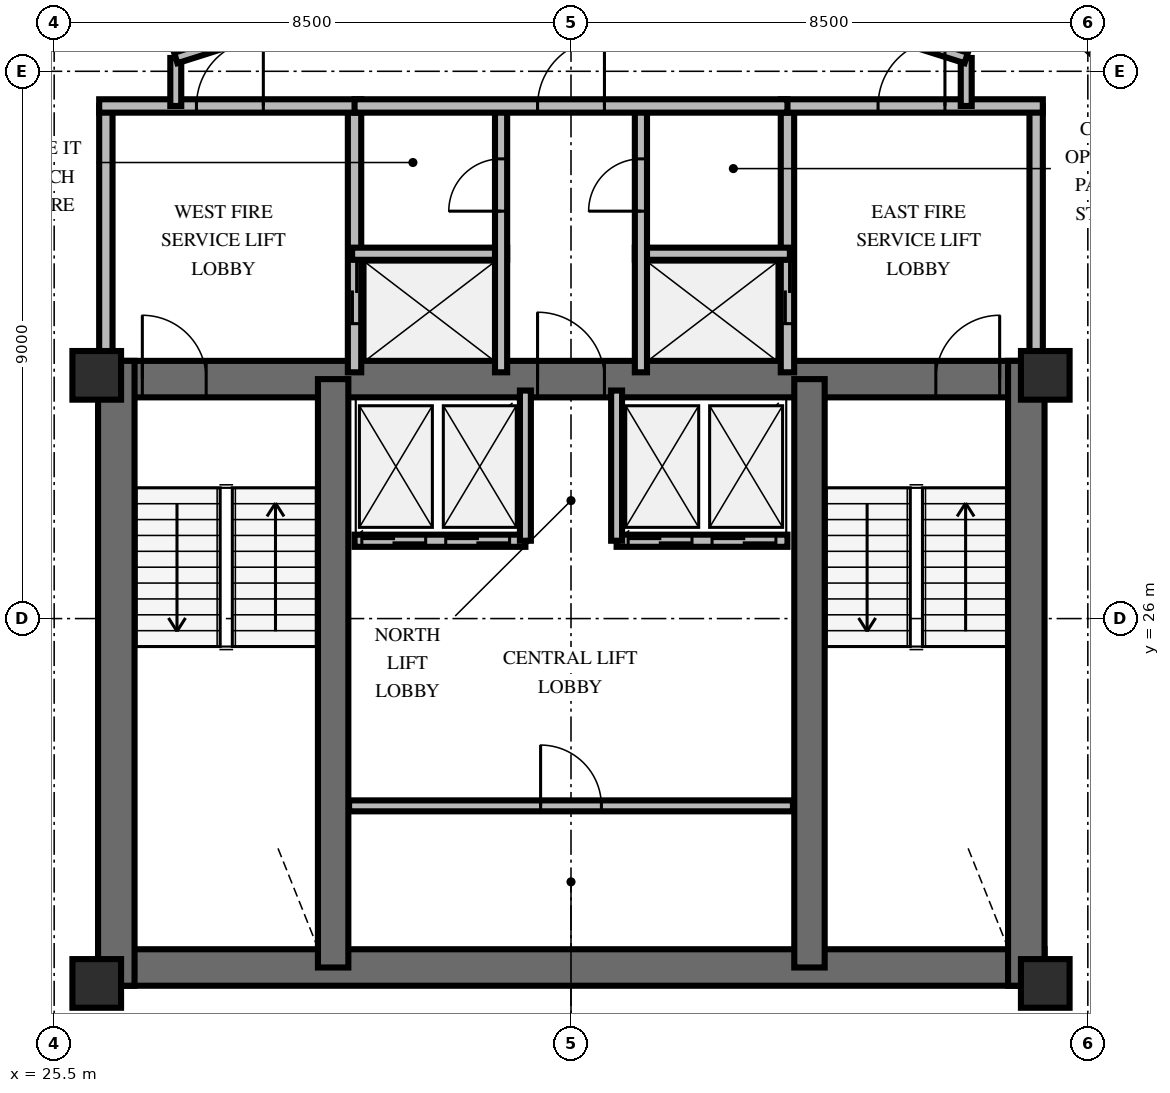
"""IFC4 building model, lengths in metres.
Left out: names, types, materials, properties, quantities, classifications, styles, units other than length and angle.
Written with IfcOpenShell. Run it as: python <this file> out.ifc"""

import sys

from ifc_helpers import new_model, si_unit, direction, frame, frame_2d, origin, origin_2d, place, context, subcontext, project, spatial, rectangle, extrude, element, fill, save


model = new_model("IFC4")
c1 = context("Model", 3, precision=1e-05, world=origin(), true_north=direction((0.0, 1.0)))
c2 = subcontext(c1, "Body", "Model", "MODEL_VIEW")
j1 = project(units=[si_unit("LENGTHUNIT", "METRE"), si_unit("PLANEANGLEUNIT", "RADIAN")], contexts=[c1])
p1 = place(None, origin())
s1 = spatial("IfcSite", under=j1, at=p1, CompositionType="ELEMENT")
p2 = place(p1, origin())
s2 = spatial("IfcBuilding", under=s1, at=p2, CompositionType="ELEMENT")
p3 = place(p2, frame((0.0, 0.0, 255.6)))
s3 = spatial("IfcBuildingStorey", under=s2, at=p3, CompositionType="ELEMENT", Elevation=255.6)
p4 = place(p3, frame((26.222, 20.262, 0.0), z_axis=(0.0, 0.0, 1.0), x_axis=(1.0, 0.0, 0.0)))
e1 = element("IfcWall", 1, at=p4, inside=s3, PredefinedType="SHEAR", context=c2, shape_type="SweptSolid", body=[
    extrude(rectangle(XDim=15.566, YDim=0.6, at=frame_2d((7.783, 0.0))), origin(), (0.0, 0.0, 1.0), 3.6),
])
p5 = place(p3, frame((26.222, 29.938, 0.0), z_axis=(0.0, 0.0, 1.0), x_axis=(1.0, 0.0, 0.0)))
e2 = element("IfcWall", 2, at=p5, inside=s3, PredefinedType="SHEAR", context=c2, shape_type="SweptSolid", body=[
    extrude(rectangle(XDim=15.566, YDim=0.6, at=frame_2d((7.783, 0.0))), origin(), (0.0, 0.0, 1.0), 3.6),
])
p6 = place(p5, frame((0.728, 0.0, 0.0)))
e3 = element("IfcOpeningElement", 3, at=p6, cuts=e2, PredefinedType="OPENING", context=c2, shape_type="SweptSolid", body=[
    extrude(rectangle(XDim=1.05, YDim=2.15, at=frame_2d((0.525, 1.075))), frame((0.0, 0.31, 0.0), z_axis=(0.0, -1.0, 0.0), x_axis=(1.0, 0.0, 0.0)), (0.0, 0.0, 1.0), 0.62),
])
p7 = place(p5, frame((13.778, 0.0, 0.0)))
e4 = element("IfcOpeningElement", 4, at=p7, cuts=e2, PredefinedType="OPENING", context=c2, shape_type="SweptSolid", body=[
    extrude(rectangle(XDim=1.05, YDim=2.15, at=frame_2d((0.525, 1.075))), frame((0.0, 0.31, 0.0), z_axis=(0.0, -1.0, 0.0), x_axis=(1.0, 0.0, 0.0)), (0.0, 0.0, 1.0), 0.62),
])
p8 = place(p5, frame((7.228, 0.0, 0.0)))
e5 = element("IfcOpeningElement", 5, at=p8, cuts=e2, PredefinedType="OPENING", context=c2, shape_type="SweptSolid", body=[
    extrude(rectangle(XDim=1.1, YDim=2.15, at=frame_2d((0.55, 1.075))), frame((0.0, 0.31, 0.0), z_axis=(0.0, -1.0, 0.0), x_axis=(1.0, 0.0, 0.0)), (0.0, 0.0, 1.0), 0.62),
])
for number, where, z_axis, x_axis in (
    (6, (26.522, 19.962, 0.0), (0.0, 0.0, 1.0), (0.0, 1.0, 0.0)),
    (7, (41.488, 19.962, 0.0), (0.0, 0.0, 1.0), (0.0, 1.0, 0.0)),
):
    element("IfcWall", number, at=place(p3, frame(where, z_axis=z_axis, x_axis=x_axis)), inside=s3, PredefinedType="SHEAR", context=c2, shape_type="SweptSolid", body=[
        extrude(rectangle(XDim=10.276, YDim=0.6, at=frame_2d((5.138, 0.0))), origin(), (0.0, 0.0, 1.0), 3.6),
    ])
for number, where, z_axis, x_axis in (
    (8, (30.088, 20.262, 0.0), (0.0, 0.0, 1.0), (0.0, 1.0, 0.0)),
    (9, (37.922, 20.262, 0.0), (0.0, 0.0, 1.0), (0.0, 1.0, 0.0)),
):
    element("IfcWall", number, at=place(p3, frame(where, z_axis=z_axis, x_axis=x_axis)), inside=s3, PredefinedType="SHEAR", context=c2, shape_type="SweptSolid", body=[
        extrude(rectangle(XDim=9.676, YDim=0.5, at=frame_2d((4.838, 0.0))), origin(), (0.0, 0.0, 1.0), 3.6),
    ])
for number, where, z_axis, x_axis in (
    (10, (26.2, 20.0, 0.0), (0.0, 0.0, 1.0), (1.0, 0.0, 0.0)),
    (11, (41.8, 20.0, 0.0), (0.0, 0.0, 1.0), (1.0, 0.0, 0.0)),
    (12, (26.2, 30.0, 0.0), (0.0, 0.0, 1.0), (1.0, 0.0, 0.0)),
    (13, (41.8, 30.0, 0.0), (0.0, 0.0, 1.0), (1.0, 0.0, 0.0)),
):
    element("IfcColumn", number, at=place(p3, frame(where, z_axis=z_axis, x_axis=x_axis)), inside=s3, PredefinedType="PILASTER", context=c2, shape_type="SweptSolid", body=[
        extrude(rectangle(XDim=0.8, YDim=0.8, at=origin_2d()), origin(), (0.0, 0.0, 1.0), 3.6),
    ])
p9 = place(p3, frame((26.35, 30.05, 0.0), z_axis=(0.0, 0.0, 1.0), x_axis=(0.0, 1.0, 0.0)))
e14 = element("IfcWall", 14, at=p9, inside=s3, PredefinedType="SOLIDWALL", context=c2, shape_type="SweptSolid", body=[
    extrude(rectangle(XDim=4.38, YDim=0.22, at=frame_2d((2.19, 0.0))), origin(), (0.0, 0.0, 1.0), 2.46),
])
p10 = place(p3, frame((30.44, 30.05, 0.0), z_axis=(0.0, 0.0, 1.0), x_axis=(0.0, 1.0, 0.0)))
e15 = element("IfcWall", 15, at=p10, inside=s3, PredefinedType="SOLIDWALL", context=c2, shape_type="SweptSolid", body=[
    extrude(rectangle(XDim=4.38, YDim=0.22, at=frame_2d((2.19, 0.0))), origin(), (0.0, 0.0, 1.0), 2.46),
])
p11 = place(p10, frame((0.8, 0.0, 0.0)))
e16 = element("IfcOpeningElement", 16, at=p11, cuts=e15, PredefinedType="OPENING", context=c2, shape_type="SweptSolid", body=[
    extrude(rectangle(XDim=1.05, YDim=2.1, at=frame_2d((0.525, 1.05))), frame((0.0, 0.12, 0.0), z_axis=(0.0, -1.0, 0.0), x_axis=(1.0, 0.0, 0.0)), (0.0, 0.0, 1.0), 0.24),
])
p12 = place(p3, frame((26.24, 34.43, 0.0), z_axis=(0.0, 0.0, 1.0), x_axis=(1.0, 0.0, 0.0)))
e17 = element("IfcWall", 17, at=p12, inside=s3, PredefinedType="SOLIDWALL", context=c2, shape_type="SweptSolid", body=[
    extrude(rectangle(XDim=4.31, YDim=0.22, at=frame_2d((2.155, 0.0))), origin(), (0.0, 0.0, 1.0), 2.46),
])
p13 = place(p12, frame((1.6, 0.0, 0.0)))
e18 = element("IfcOpeningElement", 18, at=p13, cuts=e17, PredefinedType="OPENING", context=c2, shape_type="SweptSolid", body=[
    extrude(rectangle(XDim=1.1, YDim=2.15, at=frame_2d((0.55, 1.075))), frame((0.0, 0.12, 0.0), z_axis=(0.0, -1.0, 0.0), x_axis=(1.0, 0.0, 0.0)), (0.0, 0.0, 1.0), 0.24),
])
p14 = place(p3, frame((30.4, 32.0, 0.0), z_axis=(0.0, 0.0, 1.0), x_axis=(1.0, 0.0, 0.0)))
e19 = element("IfcWall", 19, at=p14, inside=s3, PredefinedType="SOLIDWALL", context=c2, shape_type="SweptSolid", body=[
    extrude(rectangle(XDim=2.55, YDim=0.2, at=frame_2d((1.275, 0.0))), origin(), (0.0, 0.0, 1.0), 2.46),
])
p15 = place(p3, frame((32.85, 30.05, 0.0), z_axis=(0.0, 0.0, 1.0), x_axis=(0.0, 1.0, 0.0)))
e20 = element("IfcWall", 20, at=p15, inside=s3, PredefinedType="SOLIDWALL", context=c2, shape_type="SweptSolid", body=[
    extrude(rectangle(XDim=4.38, YDim=0.2, at=frame_2d((2.19, 0.0))), origin(), (0.0, 0.0, 1.0), 2.46),
])
p16 = place(p15, frame((2.65, 0.0, 0.0)))
e21 = element("IfcOpeningElement", 21, at=p16, cuts=e20, PredefinedType="OPENING", context=c2, shape_type="SweptSolid", body=[
    extrude(rectangle(XDim=0.86, YDim=2.05, at=frame_2d((0.43, 1.025))), frame((0.0, 0.11, 0.0), z_axis=(0.0, -1.0, 0.0), x_axis=(1.0, 0.0, 0.0)), (0.0, 0.0, 1.0), 0.22),
])
p17 = place(p3, frame((37.56, 30.05, 0.0), z_axis=(0.0, 0.0, 1.0), x_axis=(0.0, 1.0, 0.0)))
e22 = element("IfcWall", 22, at=p17, inside=s3, PredefinedType="SOLIDWALL", context=c2, shape_type="SweptSolid", body=[
    extrude(rectangle(XDim=4.38, YDim=0.22, at=frame_2d((2.19, 0.0))), origin(), (0.0, 0.0, 1.0), 2.46),
])
p18 = place(p17, frame((0.8, 0.0, 0.0)))
e23 = element("IfcOpeningElement", 23, at=p18, cuts=e22, PredefinedType="OPENING", context=c2, shape_type="SweptSolid", body=[
    extrude(rectangle(XDim=1.05, YDim=2.1, at=frame_2d((0.525, 1.05))), frame((0.0, 0.12, 0.0), z_axis=(0.0, -1.0, 0.0), x_axis=(1.0, 0.0, 0.0)), (0.0, 0.0, 1.0), 0.24),
])
p19 = place(p3, frame((41.65, 30.05, 0.0), z_axis=(0.0, 0.0, 1.0), x_axis=(0.0, 1.0, 0.0)))
e24 = element("IfcWall", 24, at=p19, inside=s3, PredefinedType="SOLIDWALL", context=c2, shape_type="SweptSolid", body=[
    extrude(rectangle(XDim=4.38, YDim=0.22, at=frame_2d((2.19, 0.0))), origin(), (0.0, 0.0, 1.0), 2.46),
])
p20 = place(p3, frame((37.45, 34.43, 0.0), z_axis=(0.0, 0.0, 1.0), x_axis=(1.0, 0.0, 0.0)))
e25 = element("IfcWall", 25, at=p20, inside=s3, PredefinedType="SOLIDWALL", context=c2, shape_type="SweptSolid", body=[
    extrude(rectangle(XDim=4.31, YDim=0.22, at=frame_2d((2.155, 0.0))), origin(), (0.0, 0.0, 1.0), 2.46),
])
p21 = place(p20, frame((1.6, 0.0, 0.0)))
e26 = element("IfcOpeningElement", 26, at=p21, cuts=e25, PredefinedType="OPENING", context=c2, shape_type="SweptSolid", body=[
    extrude(rectangle(XDim=1.1, YDim=2.15, at=frame_2d((0.55, 1.075))), frame((0.0, 0.12, 0.0), z_axis=(0.0, -1.0, 0.0), x_axis=(1.0, 0.0, 0.0)), (0.0, 0.0, 1.0), 0.24),
])
p22 = place(p3, frame((35.05, 32.0, 0.0), z_axis=(0.0, 0.0, 1.0), x_axis=(1.0, 0.0, 0.0)))
e27 = element("IfcWall", 27, at=p22, inside=s3, PredefinedType="SOLIDWALL", context=c2, shape_type="SweptSolid", body=[
    extrude(rectangle(XDim=2.55, YDim=0.2, at=frame_2d((1.275, 0.0))), origin(), (0.0, 0.0, 1.0), 2.46),
])
p23 = place(p3, frame((35.15, 30.05, 0.0), z_axis=(0.0, 0.0, 1.0), x_axis=(0.0, 1.0, 0.0)))
e28 = element("IfcWall", 28, at=p23, inside=s3, PredefinedType="SOLIDWALL", context=c2, shape_type="SweptSolid", body=[
    extrude(rectangle(XDim=4.38, YDim=0.2, at=frame_2d((2.19, 0.0))), origin(), (0.0, 0.0, 1.0), 2.46),
])
p24 = place(p23, frame((2.65, 0.0, 0.0)))
e29 = element("IfcOpeningElement", 29, at=p24, cuts=e28, PredefinedType="OPENING", context=c2, shape_type="SweptSolid", body=[
    extrude(rectangle(XDim=0.86, YDim=2.05, at=frame_2d((0.43, 1.025))), frame((0.0, 0.11, 0.0), z_axis=(0.0, -1.0, 0.0), x_axis=(1.0, 0.0, 0.0)), (0.0, 0.0, 1.0), 0.22),
])
p25 = place(p3, frame((30.44, 34.43, 0.0), z_axis=(0.0, 0.0, 1.0), x_axis=(1.0, 0.0, 0.0)))
e30 = element("IfcWall", 30, at=p25, inside=s3, PredefinedType="SOLIDWALL", context=c2, shape_type="SweptSolid", body=[
    extrude(rectangle(XDim=7.12, YDim=0.22, at=frame_2d((3.56, 0.0))), origin(), (0.0, 0.0, 1.0), 2.46),
])
p26 = place(p25, frame((3.01, 0.0, 0.0)))
e31 = element("IfcOpeningElement", 31, at=p26, cuts=e30, PredefinedType="OPENING", context=c2, shape_type="SweptSolid", body=[
    extrude(rectangle(XDim=1.1, YDim=2.15, at=frame_2d((0.55, 1.075))), frame((0.0, 0.12, 0.0), z_axis=(0.0, -1.0, 0.0), x_axis=(1.0, 0.0, 0.0)), (0.0, 0.0, 1.0), 0.24),
])
p27 = place(p3, frame((30.35, 22.92, 0.0), z_axis=(0.0, 0.0, 1.0), x_axis=(1.0, 0.0, 0.0)))
e32 = element("IfcWall", 32, at=p27, inside=s3, PredefinedType="PARTITIONING", context=c2, shape_type="SweptSolid", body=[
    extrude(rectangle(XDim=7.3, YDim=0.18, at=frame_2d((3.65, 0.0))), origin(), (0.0, 0.0, 1.0), 2.46),
])
p28 = place(p27, frame((3.15, 0.0, 0.0)))
e33 = element("IfcOpeningElement", 33, at=p28, cuts=e32, PredefinedType="OPENING", context=c2, shape_type="SweptSolid", body=[
    extrude(rectangle(XDim=1.0, YDim=2.15, at=frame_2d((0.5, 1.075))), frame((0.0, 0.1, 0.0), z_axis=(0.0, -1.0, 0.0), x_axis=(1.0, 0.0, 0.0)), (0.0, 0.0, 1.0), 0.2),
])
p29 = place(p3, frame((30.44, 27.28, 0.0), z_axis=(0.0, 0.0, 1.0), x_axis=(1.0, 0.0, 0.0)))
e34 = element("IfcWall", 34, at=p29, inside=s3, PredefinedType="SOLIDWALL", context=c2, shape_type="SweptSolid", body=[
    extrude(rectangle(XDim=2.81, YDim=0.2, at=frame_2d((1.405, 0.0))), origin(), (0.0, 0.0, 1.0), 2.46),
])
p30 = place(p29, frame((0.12, 0.0, 0.0)))
e35 = element("IfcOpeningElement", 35, at=p30, cuts=e34, PredefinedType="OPENING", context=c2, shape_type="SweptSolid", body=[
    extrude(rectangle(XDim=1.05, YDim=2.1, at=frame_2d((0.525, 1.05))), frame((0.0, 0.11, 0.0), z_axis=(0.0, -1.0, 0.0), x_axis=(1.0, 0.0, 0.0)), (0.0, 0.0, 1.0), 0.22),
])
p31 = place(p29, frame((1.5, 0.0, 0.0)))
e36 = element("IfcOpeningElement", 36, at=p31, cuts=e34, PredefinedType="OPENING", context=c2, shape_type="SweptSolid", body=[
    extrude(rectangle(XDim=1.05, YDim=2.1, at=frame_2d((0.525, 1.05))), frame((0.0, 0.11, 0.0), z_axis=(0.0, -1.0, 0.0), x_axis=(1.0, 0.0, 0.0)), (0.0, 0.0, 1.0), 0.22),
])
p32 = place(p3, frame((33.25, 27.28, 0.0), z_axis=(0.0, 0.0, 1.0), x_axis=(0.0, 1.0, 0.0)))
e37 = element("IfcWall", 37, at=p32, inside=s3, PredefinedType="SOLIDWALL", context=c2, shape_type="SweptSolid", body=[
    extrude(rectangle(XDim=2.47, YDim=0.18, at=frame_2d((1.235, 0.0))), origin(), (0.0, 0.0, 1.0), 2.46),
])
p33 = place(p3, frame((34.75, 27.28, 0.0), z_axis=(0.0, 0.0, 1.0), x_axis=(1.0, 0.0, 0.0)))
e38 = element("IfcWall", 38, at=p33, inside=s3, PredefinedType="SOLIDWALL", context=c2, shape_type="SweptSolid", body=[
    extrude(rectangle(XDim=2.81, YDim=0.2, at=frame_2d((1.405, 0.0))), origin(), (0.0, 0.0, 1.0), 2.46),
])
p34 = place(p33, frame((0.19, 0.0, 0.0)))
e39 = element("IfcOpeningElement", 39, at=p34, cuts=e38, PredefinedType="OPENING", context=c2, shape_type="SweptSolid", body=[
    extrude(rectangle(XDim=1.05, YDim=2.1, at=frame_2d((0.525, 1.05))), frame((0.0, 0.11, 0.0), z_axis=(0.0, -1.0, 0.0), x_axis=(1.0, 0.0, 0.0)), (0.0, 0.0, 1.0), 0.22),
])
p35 = place(p33, frame((1.57, 0.0, 0.0)))
e40 = element("IfcOpeningElement", 40, at=p35, cuts=e38, PredefinedType="OPENING", context=c2, shape_type="SweptSolid", body=[
    extrude(rectangle(XDim=1.05, YDim=2.1, at=frame_2d((0.525, 1.05))), frame((0.0, 0.11, 0.0), z_axis=(0.0, -1.0, 0.0), x_axis=(1.0, 0.0, 0.0)), (0.0, 0.0, 1.0), 0.22),
])
p36 = place(p3, frame((34.75, 27.28, 0.0), z_axis=(0.0, 0.0, 1.0), x_axis=(0.0, 1.0, 0.0)))
e41 = element("IfcWall", 41, at=p36, inside=s3, PredefinedType="SOLIDWALL", context=c2, shape_type="SweptSolid", body=[
    extrude(rectangle(XDim=2.47, YDim=0.18, at=frame_2d((1.235, 0.0))), origin(), (0.0, 0.0, 1.0), 2.46),
])
for number, where, z_axis, x_axis in (
    (42, (27.5, 34.43, 0.0), (0.0, 0.0, 1.0), (0.0, 1.0, 0.0)),
    (43, (40.5, 35.219, 0.0), (0.0, 0.0, 1.0), (0.0, -1.0, 0.0)),
):
    element("IfcWall", number, at=place(p3, frame(where, z_axis=z_axis, x_axis=x_axis)), inside=s3, PredefinedType="PARTITIONING", context=c2, shape_type="SweptSolid", body=[
        extrude(rectangle(XDim=0.789, YDim=0.18, at=frame_2d((0.395, 0.0))), origin(), (0.0, 0.0, 1.0), 2.46),
    ])
p37 = place(p3, frame((27.5, 35.219, 0.0), z_axis=(0.0, 0.0, 1.0), x_axis=(0.953228121756, 0.302251795518, 0.0)))
e44 = element("IfcWall", 44, at=p37, inside=s3, PredefinedType="PARTITIONING", context=c2, shape_type="SweptSolid", body=[
    extrude(rectangle(XDim=6.819, YDim=0.18, at=frame_2d((3.409, 0.0))), origin(), (0.0, 0.0, 1.0), 2.46),
])
p38 = place(p37, frame((2.86, 0.0, 0.0)))
e45 = element("IfcOpeningElement", 45, at=p38, cuts=e44, PredefinedType="OPENING", context=c2, shape_type="SweptSolid", body=[
    extrude(rectangle(XDim=1.1, YDim=2.15, at=frame_2d((0.55, 1.075))), frame((0.0, 0.1, 0.0), z_axis=(0.0, -1.0, 0.0), x_axis=(1.0, 0.0, 0.0)), (0.0, 0.0, 1.0), 0.2),
])
p39 = place(p3, frame((34.0, 37.28, 0.0), z_axis=(0.0, 0.0, 1.0), x_axis=(0.953228121756, -0.302251795518, 0.0)))
e46 = element("IfcWall", 46, at=p39, inside=s3, PredefinedType="PARTITIONING", context=c2, shape_type="SweptSolid", body=[
    extrude(rectangle(XDim=6.819, YDim=0.18, at=frame_2d((3.409, 0.0))), origin(), (0.0, 0.0, 1.0), 2.46),
])
p40 = place(p39, frame((2.86, 0.0, 0.0)))
e47 = element("IfcOpeningElement", 47, at=p40, cuts=e46, PredefinedType="OPENING", context=c2, shape_type="SweptSolid", body=[
    extrude(rectangle(XDim=1.1, YDim=2.15, at=frame_2d((0.55, 1.075))), frame((0.0, 0.1, 0.0), z_axis=(0.0, -1.0, 0.0), x_axis=(1.0, 0.0, 0.0)), (0.0, 0.0, 1.0), 0.2),
])
p41 = place(p3, frame((44.121, 33.95, 0.0), z_axis=(0.0, 0.0, 1.0), x_axis=(-0.733136774685, 0.680081222799, 0.0)))
e48 = element("IfcWall", 48, at=p41, inside=s3, PredefinedType="PARTITIONING", context=c2, shape_type="SweptSolid", body=[
    extrude(rectangle(XDim=4.026, YDim=0.18, at=frame_2d((2.013, 0.0))), origin(), (0.0, 0.0, 1.0), 2.46),
])
p42 = place(p3, frame((28.735, 37.744, 0.0), z_axis=(0.0, 0.0, 1.0), x_axis=(-0.827595393885, -0.561325096552, 0.0)))
e49 = element("IfcWall", 49, at=p42, inside=s3, PredefinedType="PARTITIONING", context=c2, shape_type="SweptSolid", body=[
    extrude(rectangle(XDim=4.47, YDim=0.18, at=frame_2d((2.235, 0.0))), origin(), (0.0, 0.0, 1.0), 2.46),
])
p43 = place(p6, origin())
e50 = element("IfcDoor", 50, at=p43, inside=s3, OperationType="SINGLE_SWING_LEFT", PredefinedType="DOOR", context=c2, shape_type="SweptSolid", body=[
    extrude(rectangle(XDim=1.05, YDim=2.15, at=frame_2d((0.525, 1.075))), frame((0.0, 0.025, 0.0), z_axis=(0.0, -1.0, 0.0), x_axis=(1.0, 0.0, 0.0)), (0.0, 0.0, 1.0), 0.05),
])
fill(e3, e50)
p44 = place(p7, origin())
e51 = element("IfcDoor", 51, at=p44, inside=s3, OperationType="SINGLE_SWING_RIGHT", PredefinedType="DOOR", context=c2, shape_type="SweptSolid", body=[
    extrude(rectangle(XDim=1.05, YDim=2.15, at=frame_2d((0.525, 1.075))), frame((0.0, 0.025, 0.0), z_axis=(0.0, -1.0, 0.0), x_axis=(1.0, 0.0, 0.0)), (0.0, 0.0, 1.0), 0.05),
])
fill(e4, e51)
p45 = place(p8, origin())
e52 = element("IfcDoor", 52, at=p45, inside=s3, OperationType="SINGLE_SWING_LEFT", PredefinedType="DOOR", context=c2, shape_type="SweptSolid", body=[
    extrude(rectangle(XDim=1.1, YDim=2.15, at=frame_2d((0.55, 1.075))), frame((0.0, 0.025, 0.0), z_axis=(0.0, -1.0, 0.0), x_axis=(1.0, 0.0, 0.0)), (0.0, 0.0, 1.0), 0.05),
])
fill(e5, e52)
p46 = place(p13, origin())
e53 = element("IfcDoor", 53, at=p46, inside=s3, OperationType="SINGLE_SWING_RIGHT", PredefinedType="DOOR", context=c2, shape_type="SweptSolid", body=[
    extrude(rectangle(XDim=1.1, YDim=2.15, at=frame_2d((0.55, 1.075))), frame((0.0, 0.025, 0.0), z_axis=(0.0, -1.0, 0.0), x_axis=(1.0, 0.0, 0.0)), (0.0, 0.0, 1.0), 0.05),
])
fill(e18, e53)
p47 = place(p11, origin())
e54 = element("IfcDoor", 54, at=p47, inside=s3, OperationType="DOUBLE_DOOR_SLIDING", PredefinedType="USERDEFINED", context=c2, shape_type="SweptSolid", body=[
    extrude(rectangle(XDim=1.05, YDim=2.1, at=frame_2d((0.525, 1.05))), frame((0.0, 0.025, 0.0), z_axis=(0.0, -1.0, 0.0), x_axis=(1.0, 0.0, 0.0)), (0.0, 0.0, 1.0), 0.05),
])
fill(e16, e54)
p48 = place(p16, origin())
e55 = element("IfcDoor", 55, at=p48, inside=s3, OperationType="SINGLE_SWING_LEFT", PredefinedType="TRAPDOOR", context=c2, shape_type="SweptSolid", body=[
    extrude(rectangle(XDim=0.86, YDim=2.05, at=frame_2d((0.43, 1.025))), frame((0.0, 0.025, 0.0), z_axis=(0.0, -1.0, 0.0), x_axis=(1.0, 0.0, 0.0)), (0.0, 0.0, 1.0), 0.05),
])
fill(e21, e55)
p49 = place(p21, origin())
e56 = element("IfcDoor", 56, at=p49, inside=s3, OperationType="SINGLE_SWING_RIGHT", PredefinedType="DOOR", context=c2, shape_type="SweptSolid", body=[
    extrude(rectangle(XDim=1.1, YDim=2.15, at=frame_2d((0.55, 1.075))), frame((0.0, 0.025, 0.0), z_axis=(0.0, -1.0, 0.0), x_axis=(1.0, 0.0, 0.0)), (0.0, 0.0, 1.0), 0.05),
])
fill(e26, e56)
p50 = place(p18, origin())
e57 = element("IfcDoor", 57, at=p50, inside=s3, OperationType="DOUBLE_DOOR_SLIDING", PredefinedType="USERDEFINED", context=c2, shape_type="SweptSolid", body=[
    extrude(rectangle(XDim=1.05, YDim=2.1, at=frame_2d((0.525, 1.05))), frame((0.0, 0.025, 0.0), z_axis=(0.0, -1.0, 0.0), x_axis=(1.0, 0.0, 0.0)), (0.0, 0.0, 1.0), 0.05),
])
fill(e23, e57)
p51 = place(p24, origin())
e58 = element("IfcDoor", 58, at=p51, inside=s3, OperationType="SINGLE_SWING_LEFT", PredefinedType="TRAPDOOR", context=c2, shape_type="SweptSolid", body=[
    extrude(rectangle(XDim=0.86, YDim=2.05, at=frame_2d((0.43, 1.025))), frame((0.0, 0.025, 0.0), z_axis=(0.0, -1.0, 0.0), x_axis=(1.0, 0.0, 0.0)), (0.0, 0.0, 1.0), 0.05),
])
fill(e29, e58)
p52 = place(p26, origin())
e59 = element("IfcDoor", 59, at=p52, inside=s3, OperationType="SINGLE_SWING_RIGHT", PredefinedType="DOOR", context=c2, shape_type="SweptSolid", body=[
    extrude(rectangle(XDim=1.1, YDim=2.15, at=frame_2d((0.55, 1.075))), frame((0.0, 0.025, 0.0), z_axis=(0.0, -1.0, 0.0), x_axis=(1.0, 0.0, 0.0)), (0.0, 0.0, 1.0), 0.05),
])
fill(e31, e59)
p53 = place(p28, origin())
e60 = element("IfcDoor", 60, at=p53, inside=s3, OperationType="SINGLE_SWING_LEFT", PredefinedType="DOOR", context=c2, shape_type="SweptSolid", body=[
    extrude(rectangle(XDim=1.0, YDim=2.15, at=frame_2d((0.5, 1.075))), frame((0.0, 0.025, 0.0), z_axis=(0.0, -1.0, 0.0), x_axis=(1.0, 0.0, 0.0)), (0.0, 0.0, 1.0), 0.05),
])
fill(e33, e60)
p54 = place(p30, origin())
e61 = element("IfcDoor", 61, at=p54, inside=s3, OperationType="DOUBLE_DOOR_SLIDING", PredefinedType="USERDEFINED", context=c2, shape_type="SweptSolid", body=[
    extrude(rectangle(XDim=1.05, YDim=2.1, at=frame_2d((0.525, 1.05))), frame((0.0, 0.025, 0.0), z_axis=(0.0, -1.0, 0.0), x_axis=(1.0, 0.0, 0.0)), (0.0, 0.0, 1.0), 0.05),
])
fill(e35, e61)
p55 = place(p31, origin())
e62 = element("IfcDoor", 62, at=p55, inside=s3, OperationType="DOUBLE_DOOR_SLIDING", PredefinedType="USERDEFINED", context=c2, shape_type="SweptSolid", body=[
    extrude(rectangle(XDim=1.05, YDim=2.1, at=frame_2d((0.525, 1.05))), frame((0.0, 0.025, 0.0), z_axis=(0.0, -1.0, 0.0), x_axis=(1.0, 0.0, 0.0)), (0.0, 0.0, 1.0), 0.05),
])
fill(e36, e62)
p56 = place(p34, origin())
e63 = element("IfcDoor", 63, at=p56, inside=s3, OperationType="DOUBLE_DOOR_SLIDING", PredefinedType="USERDEFINED", context=c2, shape_type="SweptSolid", body=[
    extrude(rectangle(XDim=1.05, YDim=2.1, at=frame_2d((0.525, 1.05))), frame((0.0, 0.025, 0.0), z_axis=(0.0, -1.0, 0.0), x_axis=(1.0, 0.0, 0.0)), (0.0, 0.0, 1.0), 0.05),
])
fill(e39, e63)
p57 = place(p35, origin())
e64 = element("IfcDoor", 64, at=p57, inside=s3, OperationType="DOUBLE_DOOR_SLIDING", PredefinedType="USERDEFINED", context=c2, shape_type="SweptSolid", body=[
    extrude(rectangle(XDim=1.05, YDim=2.1, at=frame_2d((0.525, 1.05))), frame((0.0, 0.025, 0.0), z_axis=(0.0, -1.0, 0.0), x_axis=(1.0, 0.0, 0.0)), (0.0, 0.0, 1.0), 0.05),
])
fill(e40, e64)
save(model, sys.argv[1])
